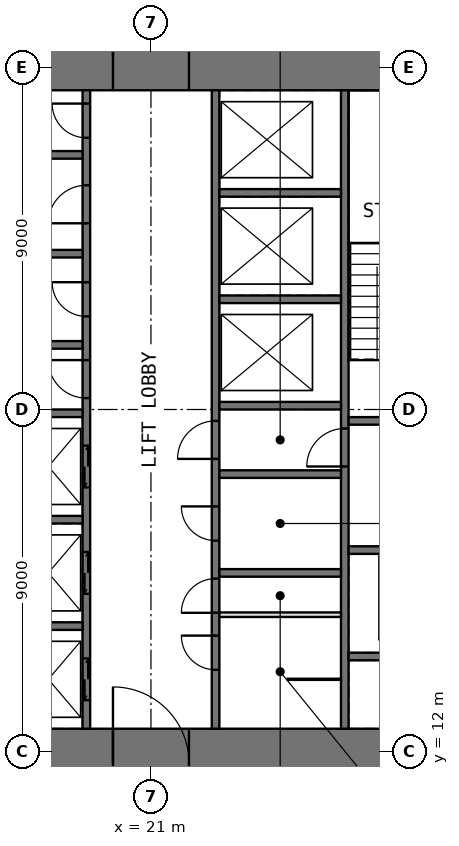
"""IFC4 building model, lengths in metres.
Left out: names, types, materials, properties, quantities, classifications, styles, units other than length and angle.
Written with IfcOpenShell. Run it as: python <this file> out.ifc"""

import sys

from ifc_helpers import new_model, si_unit, direction, frame, frame_2d, origin, place, context, subcontext, project, spatial, rectangle, extrude, element, fill, save


model = new_model("IFC4")
c1 = context("Model", 3, precision=1e-05, world=origin(), true_north=direction((0.0, 1.0)))
c2 = subcontext(c1, "Body", "Model", "MODEL_VIEW")
j1 = project(units=[si_unit("LENGTHUNIT", "METRE"), si_unit("PLANEANGLEUNIT", "RADIAN")], contexts=[c1])
p1 = place(None, origin())
s1 = spatial("IfcSite", under=j1, at=p1, CompositionType="ELEMENT")
p2 = place(p1, origin())
s2 = spatial("IfcBuilding", under=s1, at=p2, CompositionType="ELEMENT")
p3 = place(p2, frame((0.0, 0.0, 58.5)))
s3 = spatial("IfcBuildingStorey", under=s2, at=p3, CompositionType="ELEMENT", Elevation=58.5)
p4 = place(p3, frame((10.8, 11.7, -0.05), z_axis=(0.0, 0.0, 1.0), x_axis=(1.0, 0.0, 0.0)))
e1 = element("IfcWall", 1, at=p4, inside=s3, PredefinedType="SHEAR", context=c2, shape_type="SweptSolid", body=[
    extrude(rectangle(XDim=20.4, YDim=1.8, at=frame_2d((10.2, 0.0))), origin(), (0.0, 0.0, 1.0), 4.0),
])
p5 = place(p4, frame((9.2, 0.0, 0.05)))
e2 = element("IfcOpeningElement", 2, at=p5, cuts=e1, PredefinedType="OPENING", context=c2, shape_type="SweptSolid", body=[
    extrude(rectangle(XDim=2.0, YDim=2.2, at=frame_2d((1.0, 1.1))), frame((0.0, 0.91, 0.0), z_axis=(0.0, -1.0, 0.0), x_axis=(1.0, 0.0, 0.0)), (0.0, 0.0, 1.0), 1.82),
])
p6 = place(p3, frame((10.8, 30.3, -0.05), z_axis=(0.0, 0.0, 1.0), x_axis=(1.0, 0.0, 0.0)))
e3 = element("IfcWall", 3, at=p6, inside=s3, PredefinedType="SHEAR", context=c2, shape_type="SweptSolid", body=[
    extrude(rectangle(XDim=20.4, YDim=1.8, at=frame_2d((10.2, 0.0))), origin(), (0.0, 0.0, 1.0), 4.0),
])
p7 = place(p6, frame((9.2, 0.0, 0.05)))
e4 = element("IfcOpeningElement", 4, at=p7, cuts=e3, PredefinedType="OPENING", context=c2, shape_type="SweptSolid", body=[
    extrude(rectangle(XDim=2.0, YDim=2.2, at=frame_2d((1.0, 1.1))), frame((0.0, 0.91, 0.0), z_axis=(0.0, -1.0, 0.0), x_axis=(1.0, 0.0, 0.0)), (0.0, 0.0, 1.0), 1.82),
])
p8 = place(p3, frame((19.3, 12.6, -0.05), z_axis=(0.0, 0.0, 1.0), x_axis=(0.0, 1.0, 0.0)))
e5 = element("IfcWall", 5, at=p8, inside=s3, PredefinedType="SHEAR", context=c2, shape_type="SweptSolid", body=[
    extrude(rectangle(XDim=16.8, YDim=0.2, at=frame_2d((8.4, 0.0))), origin(), (0.0, 0.0, 1.0), 4.0),
])
p9 = place(p8, frame((8.7, 0.0, 0.05)))
e6 = element("IfcOpeningElement", 6, at=p9, cuts=e5, PredefinedType="OPENING", context=c2, shape_type="SweptSolid", body=[
    extrude(rectangle(XDim=1.0, YDim=2.2, at=frame_2d((0.5, 1.1))), frame((0.0, 0.11, 0.0), z_axis=(0.0, -1.0, 0.0), x_axis=(1.0, 0.0, 0.0)), (0.0, 0.0, 1.0), 0.22),
])
p10 = place(p8, frame((10.85, 0.0, 0.05)))
e7 = element("IfcOpeningElement", 7, at=p10, cuts=e5, PredefinedType="OPENING", context=c2, shape_type="SweptSolid", body=[
    extrude(rectangle(XDim=0.9, YDim=2.2, at=frame_2d((0.45, 1.1))), frame((0.0, 0.11, 0.0), z_axis=(0.0, -1.0, 0.0), x_axis=(1.0, 0.0, 0.0)), (0.0, 0.0, 1.0), 0.22),
])
p11 = place(p8, frame((13.3, 0.0, 0.05)))
e8 = element("IfcOpeningElement", 8, at=p11, cuts=e5, PredefinedType="OPENING", context=c2, shape_type="SweptSolid", body=[
    extrude(rectangle(XDim=1.0, YDim=2.2, at=frame_2d((0.5, 1.1))), frame((0.0, 0.11, 0.0), z_axis=(0.0, -1.0, 0.0), x_axis=(1.0, 0.0, 0.0)), (0.0, 0.0, 1.0), 0.22),
])
p12 = place(p8, frame((15.55, 0.0, 0.05)))
e9 = element("IfcOpeningElement", 9, at=p12, cuts=e5, PredefinedType="OPENING", context=c2, shape_type="SweptSolid", body=[
    extrude(rectangle(XDim=0.9, YDim=2.2, at=frame_2d((0.45, 1.1))), frame((0.0, 0.11, 0.0), z_axis=(0.0, -1.0, 0.0), x_axis=(1.0, 0.0, 0.0)), (0.0, 0.0, 1.0), 0.22),
])
p13 = place(p8, frame((0.75, 0.0, 0.05)))
e10 = element("IfcOpeningElement", 10, at=p13, cuts=e5, PredefinedType="OPENING", context=c2, shape_type="SweptSolid", body=[
    extrude(rectangle(XDim=1.1, YDim=2.2, at=frame_2d((0.55, 1.1))), frame((0.0, 0.11, 0.0), z_axis=(0.0, -1.0, 0.0), x_axis=(1.0, 0.0, 0.0)), (0.0, 0.0, 1.0), 0.22),
])
p14 = place(p8, frame((3.55, 0.0, 0.05)))
e11 = element("IfcOpeningElement", 11, at=p14, cuts=e5, PredefinedType="OPENING", context=c2, shape_type="SweptSolid", body=[
    extrude(rectangle(XDim=1.1, YDim=2.2, at=frame_2d((0.55, 1.1))), frame((0.0, 0.11, 0.0), z_axis=(0.0, -1.0, 0.0), x_axis=(1.0, 0.0, 0.0)), (0.0, 0.0, 1.0), 0.22),
])
p15 = place(p8, frame((6.35, 0.0, 0.05)))
e12 = element("IfcOpeningElement", 12, at=p15, cuts=e5, PredefinedType="OPENING", context=c2, shape_type="SweptSolid", body=[
    extrude(rectangle(XDim=1.1, YDim=2.2, at=frame_2d((0.55, 1.1))), frame((0.0, 0.11, 0.0), z_axis=(0.0, -1.0, 0.0), x_axis=(1.0, 0.0, 0.0)), (0.0, 0.0, 1.0), 0.22),
])
p16 = place(p3, frame((22.7, 12.6, -0.05), z_axis=(0.0, 0.0, 1.0), x_axis=(0.0, 1.0, 0.0)))
e13 = element("IfcWall", 13, at=p16, inside=s3, PredefinedType="SHEAR", context=c2, shape_type="SweptSolid", body=[
    extrude(rectangle(XDim=16.8, YDim=0.2, at=frame_2d((8.4, 0.0))), origin(), (0.0, 0.0, 1.0), 4.0),
])
p17 = place(p16, frame((3.05, 0.0, 0.05)))
e14 = element("IfcOpeningElement", 14, at=p17, cuts=e13, PredefinedType="OPENING", context=c2, shape_type="SweptSolid", body=[
    extrude(rectangle(XDim=0.9, YDim=2.2, at=frame_2d((0.45, 1.1))), frame((0.0, 0.11, 0.0), z_axis=(0.0, -1.0, 0.0), x_axis=(1.0, 0.0, 0.0)), (0.0, 0.0, 1.0), 0.22),
])
p18 = place(p16, frame((7.1, 0.0, 0.05)))
e15 = element("IfcOpeningElement", 15, at=p18, cuts=e13, PredefinedType="OPENING", context=c2, shape_type="SweptSolid", body=[
    extrude(rectangle(XDim=1.0, YDim=2.2, at=frame_2d((0.5, 1.1))), frame((0.0, 0.11, 0.0), z_axis=(0.0, -1.0, 0.0), x_axis=(1.0, 0.0, 0.0)), (0.0, 0.0, 1.0), 0.22),
])
p19 = place(p16, frame((1.55, 0.0, 0.05)))
e16 = element("IfcOpeningElement", 16, at=p19, cuts=e13, PredefinedType="OPENING", context=c2, shape_type="SweptSolid", body=[
    extrude(rectangle(XDim=0.9, YDim=2.2, at=frame_2d((0.45, 1.1))), frame((0.0, 0.11, 0.0), z_axis=(0.0, -1.0, 0.0), x_axis=(1.0, 0.0, 0.0)), (0.0, 0.0, 1.0), 0.22),
])
p20 = place(p16, frame((4.95, 0.0, 0.05)))
e17 = element("IfcOpeningElement", 17, at=p20, cuts=e13, PredefinedType="OPENING", context=c2, shape_type="SweptSolid", body=[
    extrude(rectangle(XDim=0.9, YDim=2.2, at=frame_2d((0.45, 1.1))), frame((0.0, 0.11, 0.0), z_axis=(0.0, -1.0, 0.0), x_axis=(1.0, 0.0, 0.0)), (0.0, 0.0, 1.0), 0.22),
])
p21 = place(p3, frame((26.1, 12.6, -0.05), z_axis=(0.0, 0.0, 1.0), x_axis=(0.0, 1.0, 0.0)))
e18 = element("IfcWall", 18, at=p21, inside=s3, PredefinedType="SHEAR", context=c2, shape_type="SweptSolid", body=[
    extrude(rectangle(XDim=16.8, YDim=0.2, at=frame_2d((8.4, 0.0))), origin(), (0.0, 0.0, 1.0), 4.0),
])
p22 = place(p21, frame((6.9, 0.0, 0.05)))
e19 = element("IfcOpeningElement", 19, at=p22, cuts=e18, PredefinedType="OPENING", context=c2, shape_type="SweptSolid", body=[
    extrude(rectangle(XDim=1.0, YDim=2.2, at=frame_2d((0.5, 1.1))), frame((0.0, 0.11, 0.0), z_axis=(0.0, -1.0, 0.0), x_axis=(1.0, 0.0, 0.0)), (0.0, 0.0, 1.0), 0.22),
])
for number, where, z_axis, x_axis in (
    (20, (16.0, 15.3, -0.05), (0.0, 0.0, 1.0), (1.0, 0.0, 0.0)),
    (21, (16.0, 18.1, -0.05), (0.0, 0.0, 1.0), (1.0, 0.0, 0.0)),
    (22, (16.0, 20.9, -0.05), (0.0, 0.0, 1.0), (1.0, 0.0, 0.0)),
    (23, (16.0, 22.7, -0.05), (0.0, 0.0, 1.0), (1.0, 0.0, 0.0)),
    (24, (16.0, 25.1, -0.05), (0.0, 0.0, 1.0), (1.0, 0.0, 0.0)),
    (25, (16.0, 27.7, -0.05), (0.0, 0.0, 1.0), (1.0, 0.0, 0.0)),
    (26, (22.8, 16.7, -0.05), (0.0, 0.0, 1.0), (1.0, 0.0, 0.0)),
    (27, (22.8, 19.3, -0.05), (0.0, 0.0, 1.0), (1.0, 0.0, 0.0)),
    (28, (22.8, 21.1, -0.05), (0.0, 0.0, 1.0), (1.0, 0.0, 0.0)),
    (29, (22.8, 23.9, -0.05), (0.0, 0.0, 1.0), (1.0, 0.0, 0.0)),
    (30, (22.8, 26.7, -0.05), (0.0, 0.0, 1.0), (1.0, 0.0, 0.0)),
    (31, (26.2, 14.5, -0.05), (0.0, 0.0, 1.0), (1.0, 0.0, 0.0)),
):
    element("IfcWall", number, at=place(p3, frame(where, z_axis=z_axis, x_axis=x_axis)), inside=s3, PredefinedType="SHEAR", context=c2, shape_type="SweptSolid", body=[
        extrude(rectangle(XDim=3.2, YDim=0.2, at=frame_2d((1.6, 0.0))), origin(), (0.0, 0.0, 1.0), 4.0),
    ])
p23 = place(p3, frame((26.2, 17.3, -0.05), z_axis=(0.0, 0.0, 1.0), x_axis=(1.0, 0.0, 0.0)))
e32 = element("IfcWall", 32, at=p23, inside=s3, PredefinedType="SHEAR", context=c2, shape_type="SweptSolid", body=[
    extrude(rectangle(XDim=3.2, YDim=0.2, at=frame_2d((1.6, 0.0))), origin(), (0.0, 0.0, 1.0), 4.0),
])
p24 = place(p23, frame((1.0, 0.0, 0.05)))
e33 = element("IfcOpeningElement", 33, at=p24, cuts=e32, PredefinedType="OPENING", context=c2, shape_type="SweptSolid", body=[
    extrude(rectangle(XDim=1.2, YDim=2.2, at=frame_2d((0.6, 1.1))), frame((0.0, 0.11, 0.0), z_axis=(0.0, -1.0, 0.0), x_axis=(1.0, 0.0, 0.0)), (0.0, 0.0, 1.0), 0.22),
])
p25 = place(p3, frame((26.2, 20.7, -0.05), z_axis=(0.0, 0.0, 1.0), x_axis=(1.0, 0.0, 0.0)))
e34 = element("IfcWall", 34, at=p25, inside=s3, PredefinedType="SHEAR", context=c2, shape_type="SweptSolid", body=[
    extrude(rectangle(XDim=3.2, YDim=0.2, at=frame_2d((1.6, 0.0))), origin(), (0.0, 0.0, 1.0), 4.0),
])
p26 = place(p25, frame((1.1, 0.0, 0.05)))
e35 = element("IfcOpeningElement", 35, at=p26, cuts=e34, PredefinedType="OPENING", context=c2, shape_type="SweptSolid", body=[
    extrude(rectangle(XDim=1.0, YDim=2.2, at=frame_2d((0.5, 1.1))), frame((0.0, 0.11, 0.0), z_axis=(0.0, -1.0, 0.0), x_axis=(1.0, 0.0, 0.0)), (0.0, 0.0, 1.0), 0.22),
])
p27 = place(p3, frame((22.8, 15.6, 0.0), z_axis=(0.0, 0.0, 1.0), x_axis=(1.0, 0.0, 0.0)))
e36 = element("IfcWall", 36, at=p27, inside=s3, PredefinedType="PARTITIONING", context=c2, shape_type="SweptSolid", body=[
    extrude(rectangle(XDim=3.2, YDim=0.12, at=frame_2d((1.6, 0.0))), origin(), (0.0, 0.0, 1.0), 3.75),
])
p28 = place(p3, frame((24.6, 13.9, 0.0), z_axis=(0.0, 0.0, 1.0), x_axis=(1.0, 0.0, 0.0)))
e37 = element("IfcWall", 37, at=p28, inside=s3, PredefinedType="PARTITIONING", context=c2, shape_type="SweptSolid", body=[
    extrude(rectangle(XDim=1.4, YDim=0.03, at=frame_2d((0.7, 0.0))), origin(), (0.0, 0.0, 1.0), 3.75),
])
p29 = place(p5, origin())
e38 = element("IfcDoor", 38, at=p29, inside=s3, OperationType="DOUBLE_DOOR_SINGLE_SWING", PredefinedType="DOOR", context=c2, shape_type="SweptSolid", body=[
    extrude(rectangle(XDim=2.0, YDim=2.2, at=frame_2d((1.0, 1.1))), frame((0.0, 0.025, 0.0), z_axis=(0.0, -1.0, 0.0), x_axis=(1.0, 0.0, 0.0)), (0.0, 0.0, 1.0), 0.05),
])
fill(e2, e38)
p30 = place(p7, origin())
e39 = element("IfcDoor", 39, at=p30, inside=s3, OperationType="DOUBLE_DOOR_SINGLE_SWING", PredefinedType="DOOR", context=c2, shape_type="SweptSolid", body=[
    extrude(rectangle(XDim=2.0, YDim=2.2, at=frame_2d((1.0, 1.1))), frame((0.0, 0.025, 0.0), z_axis=(0.0, -1.0, 0.0), x_axis=(1.0, 0.0, 0.0)), (0.0, 0.0, 1.0), 0.05),
])
fill(e4, e39)
p31 = place(p17, origin())
e40 = element("IfcDoor", 40, at=p31, inside=s3, OperationType="SINGLE_SWING_LEFT", PredefinedType="DOOR", context=c2, shape_type="SweptSolid", body=[
    extrude(rectangle(XDim=0.9, YDim=2.2, at=frame_2d((0.45, 1.1))), frame((0.0, 0.025, 0.0), z_axis=(0.0, -1.0, 0.0), x_axis=(1.0, 0.0, 0.0)), (0.0, 0.0, 1.0), 0.05),
])
fill(e14, e40)
p32 = place(p22, origin())
e41 = element("IfcDoor", 41, at=p32, inside=s3, OperationType="SINGLE_SWING_LEFT", PredefinedType="DOOR", context=c2, shape_type="SweptSolid", body=[
    extrude(rectangle(XDim=1.0, YDim=2.2, at=frame_2d((0.5, 1.1))), frame((0.0, 0.025, 0.0), z_axis=(0.0, -1.0, 0.0), x_axis=(1.0, 0.0, 0.0)), (0.0, 0.0, 1.0), 0.05),
])
fill(e19, e41)
p33 = place(p9, origin())
e42 = element("IfcDoor", 42, at=p33, inside=s3, OperationType="SINGLE_SWING_RIGHT", PredefinedType="DOOR", context=c2, shape_type="SweptSolid", body=[
    extrude(rectangle(XDim=1.0, YDim=2.2, at=frame_2d((0.5, 1.1))), frame((0.0, 0.025, 0.0), z_axis=(0.0, -1.0, 0.0), x_axis=(1.0, 0.0, 0.0)), (0.0, 0.0, 1.0), 0.05),
])
fill(e6, e42)
p34 = place(p18, origin())
e43 = element("IfcDoor", 43, at=p34, inside=s3, OperationType="SINGLE_SWING_LEFT", PredefinedType="DOOR", context=c2, shape_type="SweptSolid", body=[
    extrude(rectangle(XDim=1.0, YDim=2.2, at=frame_2d((0.5, 1.1))), frame((0.0, 0.025, 0.0), z_axis=(0.0, -1.0, 0.0), x_axis=(1.0, 0.0, 0.0)), (0.0, 0.0, 1.0), 0.05),
])
fill(e15, e43)
p35 = place(p10, origin())
e44 = element("IfcDoor", 44, at=p35, inside=s3, OperationType="SINGLE_SWING_RIGHT", PredefinedType="DOOR", context=c2, shape_type="SweptSolid", body=[
    extrude(rectangle(XDim=0.9, YDim=2.2, at=frame_2d((0.45, 1.1))), frame((0.0, 0.025, 0.0), z_axis=(0.0, -1.0, 0.0), x_axis=(1.0, 0.0, 0.0)), (0.0, 0.0, 1.0), 0.05),
])
fill(e7, e44)
p36 = place(p11, origin())
e45 = element("IfcDoor", 45, at=p36, inside=s3, OperationType="SINGLE_SWING_LEFT", PredefinedType="DOOR", context=c2, shape_type="SweptSolid", body=[
    extrude(rectangle(XDim=1.0, YDim=2.2, at=frame_2d((0.5, 1.1))), frame((0.0, 0.025, 0.0), z_axis=(0.0, -1.0, 0.0), x_axis=(1.0, 0.0, 0.0)), (0.0, 0.0, 1.0), 0.05),
])
fill(e8, e45)
p37 = place(p12, origin())
e46 = element("IfcDoor", 46, at=p37, inside=s3, OperationType="SINGLE_SWING_RIGHT", PredefinedType="DOOR", context=c2, shape_type="SweptSolid", body=[
    extrude(rectangle(XDim=0.9, YDim=2.2, at=frame_2d((0.45, 1.1))), frame((0.0, 0.025, 0.0), z_axis=(0.0, -1.0, 0.0), x_axis=(1.0, 0.0, 0.0)), (0.0, 0.0, 1.0), 0.05),
])
fill(e9, e46)
p38 = place(p19, origin())
e47 = element("IfcDoor", 47, at=p38, inside=s3, OperationType="SINGLE_SWING_RIGHT", PredefinedType="DOOR", context=c2, shape_type="SweptSolid", body=[
    extrude(rectangle(XDim=0.9, YDim=2.2, at=frame_2d((0.45, 1.1))), frame((0.0, 0.025, 0.0), z_axis=(0.0, -1.0, 0.0), x_axis=(1.0, 0.0, 0.0)), (0.0, 0.0, 1.0), 0.05),
])
fill(e16, e47)
p39 = place(p20, origin())
e48 = element("IfcDoor", 48, at=p39, inside=s3, OperationType="SINGLE_SWING_RIGHT", PredefinedType="DOOR", context=c2, shape_type="SweptSolid", body=[
    extrude(rectangle(XDim=0.9, YDim=2.2, at=frame_2d((0.45, 1.1))), frame((0.0, 0.025, 0.0), z_axis=(0.0, -1.0, 0.0), x_axis=(1.0, 0.0, 0.0)), (0.0, 0.0, 1.0), 0.05),
])
fill(e17, e48)
p40 = place(p13, origin())
e49 = element("IfcDoor", 49, at=p40, inside=s3, OperationType="DOUBLE_DOOR_SLIDING", PredefinedType="DOOR", context=c2, shape_type="SweptSolid", body=[
    extrude(rectangle(XDim=1.1, YDim=2.2, at=frame_2d((0.55, 1.1))), frame((0.0, 0.025, 0.0), z_axis=(0.0, -1.0, 0.0), x_axis=(1.0, 0.0, 0.0)), (0.0, 0.0, 1.0), 0.05),
])
fill(e10, e49)
p41 = place(p14, origin())
e50 = element("IfcDoor", 50, at=p41, inside=s3, OperationType="DOUBLE_DOOR_SLIDING", PredefinedType="DOOR", context=c2, shape_type="SweptSolid", body=[
    extrude(rectangle(XDim=1.1, YDim=2.2, at=frame_2d((0.55, 1.1))), frame((0.0, 0.025, 0.0), z_axis=(0.0, -1.0, 0.0), x_axis=(1.0, 0.0, 0.0)), (0.0, 0.0, 1.0), 0.05),
])
fill(e11, e50)
p42 = place(p15, origin())
e51 = element("IfcDoor", 51, at=p42, inside=s3, OperationType="DOUBLE_DOOR_SLIDING", PredefinedType="DOOR", context=c2, shape_type="SweptSolid", body=[
    extrude(rectangle(XDim=1.1, YDim=2.2, at=frame_2d((0.55, 1.1))), frame((0.0, 0.025, 0.0), z_axis=(0.0, -1.0, 0.0), x_axis=(1.0, 0.0, 0.0)), (0.0, 0.0, 1.0), 0.05),
])
fill(e12, e51)
save(model, sys.argv[1])
